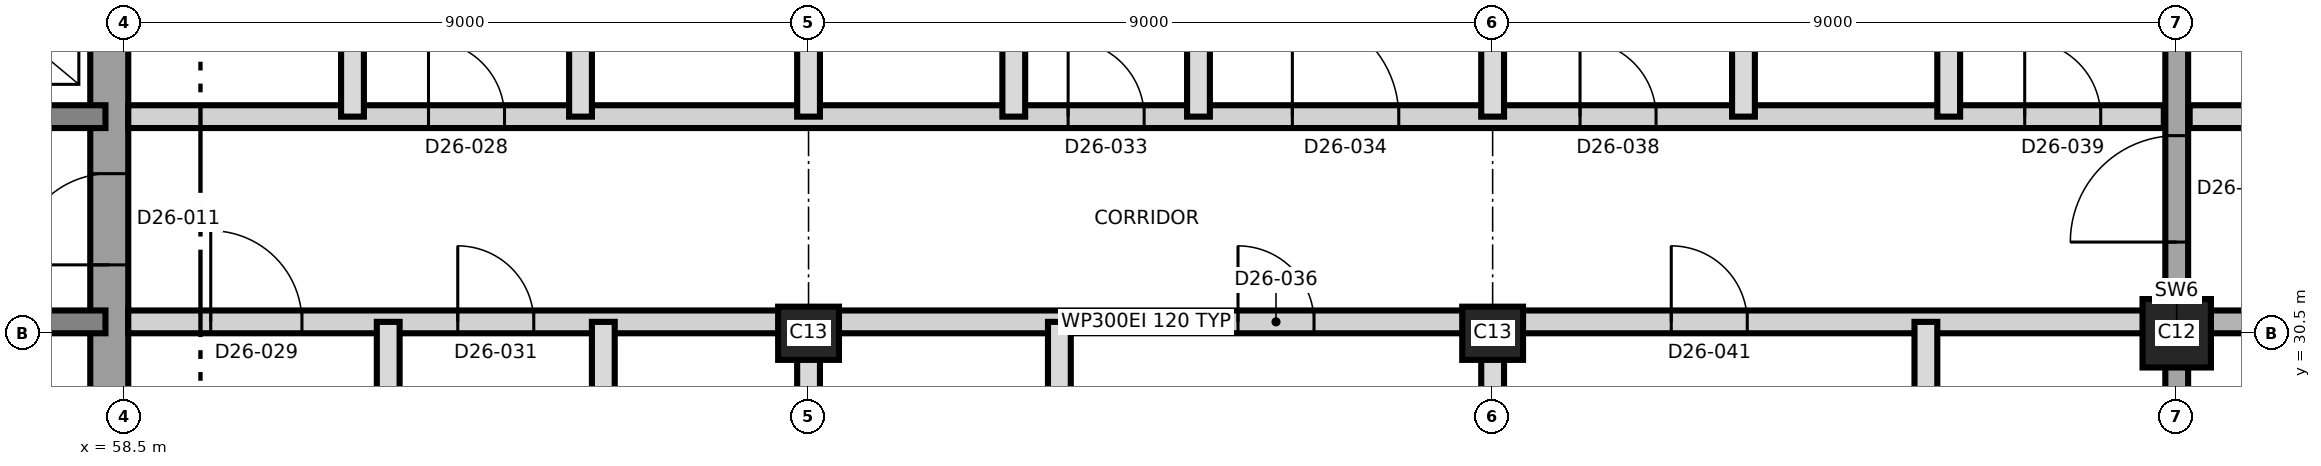
"""IFC4 building model, lengths in metres.
Left out: names, types, materials, properties, quantities, classifications, styles, units other than length and angle.
Written with IfcOpenShell. Run it as: python <this file> out.ifc"""

import sys

from ifc_helpers import new_model, si_unit, direction, frame, frame_2d, origin, origin_2d, place, context, subcontext, project, spatial, rectangle, extrude, element, fill, save


model = new_model("IFC4")
c1 = context("Model", 3, precision=1e-05, world=origin(), true_north=direction((0.0, 1.0)))
c2 = subcontext(c1, "Body", "Model", "MODEL_VIEW")
j1 = project(units=[si_unit("LENGTHUNIT", "METRE"), si_unit("PLANEANGLEUNIT", "RADIAN")], contexts=[c1])
p1 = place(None, origin())
s1 = spatial("IfcSite", under=j1, at=p1, CompositionType="ELEMENT")
p2 = place(p1, origin())
s2 = spatial("IfcBuilding", under=s1, at=p2, CompositionType="ELEMENT")
p3 = place(p2, frame((0.0, 0.0, 240.2)))
s3 = spatial("IfcBuildingStorey", under=s2, at=p3, CompositionType="ELEMENT", Elevation=240.2)
p4 = place(p3, frame((58.3, 21.25, 0.0), z_axis=(0.0, 0.0, 1.0), x_axis=(0.0, 1.0, 0.0)))
e1 = element("IfcWall", 1, at=p4, inside=s3, PredefinedType="SHEAR", context=c2, shape_type="SweptSolid", body=[
    extrude(rectangle(XDim=18.5, YDim=0.5, at=frame_2d((9.25, 0.0))), origin(), (0.0, 0.0, 1.0), 3.7),
])
p5 = place(p4, frame((10.15, 0.0, 0.0)))
e2 = element("IfcOpeningElement", 2, at=p5, cuts=e1, PredefinedType="OPENING", context=c2, shape_type="SweptSolid", body=[
    extrude(rectangle(XDim=1.2, YDim=2.1, at=frame_2d((0.6, 1.05))), frame((0.0, 0.26, 0.0), z_axis=(0.0, -1.0, 0.0), x_axis=(1.0, 0.0, 0.0)), (0.0, 0.0, 1.0), 0.52),
])
p6 = place(p3, frame((31.75, 30.65, 0.0), z_axis=(0.0, 0.0, 1.0), x_axis=(1.0, 0.0, 0.0)))
e3 = element("IfcWall", 3, at=p6, inside=s3, PredefinedType="SHEAR", context=c2, shape_type="SweptSolid", body=[
    extrude(rectangle(XDim=26.5, YDim=0.3, at=frame_2d((13.25, 0.0))), origin(), (0.0, 0.0, 1.0), 3.7),
])
p7 = place(p6, frame((24.75, 0.0, 0.0)))
e4 = element("IfcOpeningElement", 4, at=p7, cuts=e3, PredefinedType="OPENING", context=c2, shape_type="SweptSolid", body=[
    extrude(rectangle(XDim=1.0, YDim=2.1, at=frame_2d((0.5, 1.05))), frame((0.0, 0.16, 0.0), z_axis=(0.0, -1.0, 0.0), x_axis=(1.0, 0.0, 0.0)), (0.0, 0.0, 1.0), 0.32),
])
p8 = place(p3, frame((31.75, 33.35, 0.0), z_axis=(0.0, 0.0, 1.0), x_axis=(1.0, 0.0, 0.0)))
e5 = element("IfcWall", 5, at=p8, inside=s3, PredefinedType="SHEAR", context=c2, shape_type="SweptSolid", body=[
    extrude(rectangle(XDim=26.5, YDim=0.3, at=frame_2d((13.25, 0.0))), origin(), (0.0, 0.0, 1.0), 3.7),
])
p9 = place(p8, frame((13.9, 0.0, 0.0)))
e6 = element("IfcOpeningElement", 6, at=p9, cuts=e5, PredefinedType="OPENING", context=c2, shape_type="SweptSolid", body=[
    extrude(rectangle(XDim=1.4, YDim=2.1, at=frame_2d((0.7, 1.05))), frame((0.0, 0.16, 0.0), z_axis=(0.0, -1.0, 0.0), x_axis=(1.0, 0.0, 0.0)), (0.0, 0.0, 1.0), 0.32),
])
p10 = place(p8, frame((5.375, 0.0, 0.0)))
e7 = element("IfcOpeningElement", 7, at=p10, cuts=e5, PredefinedType="OPENING", context=c2, shape_type="SweptSolid", body=[
    extrude(rectangle(XDim=1.2, YDim=2.1, at=frame_2d((0.6, 1.05))), frame((0.0, 0.16, 0.0), z_axis=(0.0, -1.0, 0.0), x_axis=(1.0, 0.0, 0.0)), (0.0, 0.0, 1.0), 0.32),
])
p11 = place(p8, frame((19.925, 0.0, 0.0)))
e8 = element("IfcOpeningElement", 8, at=p11, cuts=e5, PredefinedType="OPENING", context=c2, shape_type="SweptSolid", body=[
    extrude(rectangle(XDim=1.2, YDim=2.1, at=frame_2d((0.6, 1.05))), frame((0.0, 0.16, 0.0), z_axis=(0.0, -1.0, 0.0), x_axis=(1.0, 0.0, 0.0)), (0.0, 0.0, 1.0), 0.32),
])
for number, where, z_axis, x_axis in (
    (9, (67.5, 30.5, 0.0), (0.0, 0.0, 1.0), (1.0, 0.0, 0.0)),
    (10, (76.5, 30.5, 0.0), (0.0, 0.0, 1.0), (1.0, 0.0, 0.0)),
):
    element("IfcColumn", number, at=place(p3, frame(where, z_axis=z_axis, x_axis=x_axis)), inside=s3, PredefinedType="COLUMN", context=c2, shape_type="SweptSolid", body=[
        extrude(rectangle(XDim=0.8, YDim=0.7, at=origin_2d()), origin(), (0.0, 0.0, 1.0), 3.7),
    ])
p12 = place(p3, frame((85.5, 30.5, 0.0), z_axis=(0.0, 0.0, 1.0), x_axis=(1.0, 0.0, 0.0)))
e11 = element("IfcColumn", 11, at=p12, inside=s3, PredefinedType="COLUMN", context=c2, shape_type="SweptSolid", body=[
    extrude(rectangle(XDim=0.9, YDim=0.9, at=origin_2d()), origin(), (0.0, 0.0, 1.0), 3.7),
])
p13 = place(p3, frame((85.5, 19.275, 0.0), z_axis=(0.0, 0.0, 1.0), x_axis=(0.0, 1.0, 0.0)))
e12 = element("IfcWall", 12, at=p13, inside=s3, PredefinedType="SHEAR", context=c2, shape_type="SweptSolid", body=[
    extrude(rectangle(XDim=22.45, YDim=0.3, at=frame_2d((11.225, 0.0))), origin(), (0.0, 0.0, 1.0), 3.7),
])
p14 = place(p13, frame((12.425, 0.0, 0.0)))
e13 = element("IfcOpeningElement", 13, at=p14, cuts=e12, PredefinedType="OPENING", context=c2, shape_type="SweptSolid", body=[
    extrude(rectangle(XDim=1.4, YDim=2.1, at=frame_2d((0.7, 1.05))), frame((0.0, 0.16, 0.0), z_axis=(0.0, -1.0, 0.0), x_axis=(1.0, 0.0, 0.0)), (0.0, 0.0, 1.0), 0.32),
])
p15 = place(p3, frame((58.55, 30.65, 0.0), z_axis=(0.0, 0.0, 1.0), x_axis=(1.0, 0.0, 0.0)))
e14 = element("IfcWall", 14, at=p15, inside=s3, PredefinedType="PARTITIONING", context=c2, shape_type="SweptSolid", body=[
    extrude(rectangle(XDim=26.78, YDim=0.3, at=frame_2d((13.39, 0.0))), origin(), (0.0, 0.0, 1.0), 3.4),
])
p16 = place(p15, frame((1.085, 0.0, 0.0)))
e15 = element("IfcOpeningElement", 15, at=p16, cuts=e14, PredefinedType="OPENING", context=c2, shape_type="SweptSolid", body=[
    extrude(rectangle(XDim=1.2, YDim=2.1, at=frame_2d((0.6, 1.05))), frame((0.0, 0.16, 0.0), z_axis=(0.0, -1.0, 0.0), x_axis=(1.0, 0.0, 0.0)), (0.0, 0.0, 1.0), 0.32),
])
p17 = place(p15, frame((4.335, 0.0, 0.0)))
e16 = element("IfcOpeningElement", 16, at=p17, cuts=e14, PredefinedType="OPENING", context=c2, shape_type="SweptSolid", body=[
    extrude(rectangle(XDim=1.0, YDim=2.1, at=frame_2d((0.5, 1.05))), frame((0.0, 0.16, 0.0), z_axis=(0.0, -1.0, 0.0), x_axis=(1.0, 0.0, 0.0)), (0.0, 0.0, 1.0), 0.32),
])
p18 = place(p15, frame((14.6, 0.0, 0.0)))
e17 = element("IfcOpeningElement", 17, at=p18, cuts=e14, PredefinedType="OPENING", context=c2, shape_type="SweptSolid", body=[
    extrude(rectangle(XDim=1.0, YDim=2.4, at=frame_2d((0.5, 1.2))), frame((0.0, 0.16, 0.0), z_axis=(0.0, -1.0, 0.0), x_axis=(1.0, 0.0, 0.0)), (0.0, 0.0, 1.0), 0.32),
])
p19 = place(p15, frame((20.3, 0.0, 0.0)))
e18 = element("IfcOpeningElement", 18, at=p19, cuts=e14, PredefinedType="OPENING", context=c2, shape_type="SweptSolid", body=[
    extrude(rectangle(XDim=1.0, YDim=2.4, at=frame_2d((0.5, 1.2))), frame((0.0, 0.16, 0.0), z_axis=(0.0, -1.0, 0.0), x_axis=(1.0, 0.0, 0.0)), (0.0, 0.0, 1.0), 0.32),
])
p20 = place(p3, frame((85.67, 30.65, 0.0), z_axis=(0.0, 0.0, 1.0), x_axis=(1.0, 0.0, 0.0)))
e19 = element("IfcWall", 19, at=p20, inside=s3, PredefinedType="SHEAR", context=c2, shape_type="SweptSolid", body=[
    extrude(rectangle(XDim=9.58, YDim=0.3, at=frame_2d((4.79, 0.0))), origin(), (0.0, 0.0, 1.0), 3.4),
])
p21 = place(p20, frame((2.08, 0.0, 0.0)))
e20 = element("IfcOpeningElement", 20, at=p21, cuts=e19, PredefinedType="OPENING", context=c2, shape_type="SweptSolid", body=[
    extrude(rectangle(XDim=1.2, YDim=2.1, at=frame_2d((0.6, 1.05))), frame((0.0, 0.16, 0.0), z_axis=(0.0, -1.0, 0.0), x_axis=(1.0, 0.0, 0.0)), (0.0, 0.0, 1.0), 0.32),
])
p22 = place(p20, frame((5.63, 0.0, 0.0)))
e21 = element("IfcOpeningElement", 21, at=p22, cuts=e19, PredefinedType="OPENING", context=c2, shape_type="SweptSolid", body=[
    extrude(rectangle(XDim=1.0, YDim=2.1, at=frame_2d((0.5, 1.05))), frame((0.0, 0.16, 0.0), z_axis=(0.0, -1.0, 0.0), x_axis=(1.0, 0.0, 0.0)), (0.0, 0.0, 1.0), 0.32),
])
p23 = place(p3, frame((58.55, 33.35, 0.0), z_axis=(0.0, 0.0, 1.0), x_axis=(1.0, 0.0, 0.0)))
e22 = element("IfcWall", 22, at=p23, inside=s3, PredefinedType="PARTITIONING", context=c2, shape_type="SweptSolid", body=[
    extrude(rectangle(XDim=26.78, YDim=0.3, at=frame_2d((13.39, 0.0))), origin(), (0.0, 0.0, 1.0), 3.4),
])
p24 = place(p23, frame((3.95, 0.0, 0.0)))
e23 = element("IfcOpeningElement", 23, at=p24, cuts=e22, PredefinedType="OPENING", context=c2, shape_type="SweptSolid", body=[
    extrude(rectangle(XDim=1.0, YDim=2.4, at=frame_2d((0.5, 1.2))), frame((0.0, 0.16, 0.0), z_axis=(0.0, -1.0, 0.0), x_axis=(1.0, 0.0, 0.0)), (0.0, 0.0, 1.0), 0.32),
])
p25 = place(p23, frame((12.365, 0.0, 0.0)))
e24 = element("IfcOpeningElement", 24, at=p25, cuts=e22, PredefinedType="OPENING", context=c2, shape_type="SweptSolid", body=[
    extrude(rectangle(XDim=1.0, YDim=2.1, at=frame_2d((0.5, 1.05))), frame((0.0, 0.16, 0.0), z_axis=(0.0, -1.0, 0.0), x_axis=(1.0, 0.0, 0.0)), (0.0, 0.0, 1.0), 0.32),
])
p26 = place(p23, frame((15.315, 0.0, 0.0)))
e25 = element("IfcOpeningElement", 25, at=p26, cuts=e22, PredefinedType="OPENING", context=c2, shape_type="SweptSolid", body=[
    extrude(rectangle(XDim=1.4, YDim=2.1, at=frame_2d((0.7, 1.05))), frame((0.0, 0.16, 0.0), z_axis=(0.0, -1.0, 0.0), x_axis=(1.0, 0.0, 0.0)), (0.0, 0.0, 1.0), 0.32),
])
p27 = place(p23, frame((19.1, 0.0, 0.0)))
e26 = element("IfcOpeningElement", 26, at=p27, cuts=e22, PredefinedType="OPENING", context=c2, shape_type="SweptSolid", body=[
    extrude(rectangle(XDim=1.0, YDim=2.1, at=frame_2d((0.5, 1.05))), frame((0.0, 0.16, 0.0), z_axis=(0.0, -1.0, 0.0), x_axis=(1.0, 0.0, 0.0)), (0.0, 0.0, 1.0), 0.32),
])
p28 = place(p23, frame((24.95, 0.0, 0.0)))
e27 = element("IfcOpeningElement", 27, at=p28, cuts=e22, PredefinedType="OPENING", context=c2, shape_type="SweptSolid", body=[
    extrude(rectangle(XDim=1.0, YDim=2.1, at=frame_2d((0.5, 1.05))), frame((0.0, 0.16, 0.0), z_axis=(0.0, -1.0, 0.0), x_axis=(1.0, 0.0, 0.0)), (0.0, 0.0, 1.0), 0.32),
])
p29 = place(p3, frame((85.67, 33.35, 0.0), z_axis=(0.0, 0.0, 1.0), x_axis=(1.0, 0.0, 0.0)))
e28 = element("IfcWall", 28, at=p29, inside=s3, PredefinedType="PARTITIONING", context=c2, shape_type="SweptSolid", body=[
    extrude(rectangle(XDim=9.58, YDim=0.3, at=frame_2d((4.79, 0.0))), origin(), (0.0, 0.0, 1.0), 3.4),
])
p30 = place(p29, frame((1.83, 0.0, 0.0)))
e29 = element("IfcOpeningElement", 29, at=p30, cuts=e28, PredefinedType="OPENING", context=c2, shape_type="SweptSolid", body=[
    extrude(rectangle(XDim=1.0, YDim=2.1, at=frame_2d((0.5, 1.05))), frame((0.0, 0.16, 0.0), z_axis=(0.0, -1.0, 0.0), x_axis=(1.0, 0.0, 0.0)), (0.0, 0.0, 1.0), 0.32),
])
p31 = place(p29, frame((5.63, 0.0, 0.0)))
e30 = element("IfcOpeningElement", 30, at=p31, cuts=e28, PredefinedType="OPENING", context=c2, shape_type="SweptSolid", body=[
    extrude(rectangle(XDim=1.0, YDim=2.1, at=frame_2d((0.5, 1.05))), frame((0.0, 0.16, 0.0), z_axis=(0.0, -1.0, 0.0), x_axis=(1.0, 0.0, 0.0)), (0.0, 0.0, 1.0), 0.32),
])
p32 = place(p3, frame((61.5, 33.35, 0.0), z_axis=(0.0, 0.0, 1.0), x_axis=(0.0, 1.0, 0.0)))
e31 = element("IfcWall", 31, at=p32, inside=s3, PredefinedType="PARTITIONING", context=c2, shape_type="SweptSolid", body=[
    extrude(rectangle(XDim=3.3, YDim=0.3, at=frame_2d((1.65, 0.0))), origin(), (0.0, 0.0, 1.0), 3.4),
])
p33 = place(p3, frame((61.97, 19.275, 0.0), z_axis=(0.0, 0.0, 1.0), x_axis=(0.0, 1.0, 0.0)))
e32 = element("IfcWall", 32, at=p33, inside=s3, PredefinedType="PARTITIONING", context=c2, shape_type="SweptSolid", body=[
    extrude(rectangle(XDim=11.375, YDim=0.3, at=frame_2d((5.688, 0.0))), origin(), (0.0, 0.0, 1.0), 3.35),
])
p34 = place(p3, frame((64.5, 33.35, 0.0), z_axis=(0.0, 0.0, 1.0), x_axis=(0.0, 1.0, 0.0)))
e33 = element("IfcWall", 33, at=p34, inside=s3, PredefinedType="PARTITIONING", context=c2, shape_type="SweptSolid", body=[
    extrude(rectangle(XDim=3.3, YDim=0.3, at=frame_2d((1.65, 0.0))), origin(), (0.0, 0.0, 1.0), 3.4),
])
p35 = place(p3, frame((64.8, 27.45, 0.0), z_axis=(0.0, 0.0, 1.0), x_axis=(0.0, 1.0, 0.0)))
e34 = element("IfcWall", 34, at=p35, inside=s3, PredefinedType="PARTITIONING", context=c2, shape_type="SweptSolid", body=[
    extrude(rectangle(XDim=3.2, YDim=0.3, at=frame_2d((1.6, 0.0))), origin(), (0.0, 0.0, 1.0), 3.4),
])
p36 = place(p3, frame((67.5, 19.275, 0.0), z_axis=(0.0, 0.0, 1.0), x_axis=(0.0, 1.0, 0.0)))
e35 = element("IfcWall", 35, at=p36, inside=s3, PredefinedType="PARTITIONING", context=c2, shape_type="SweptSolid", body=[
    extrude(rectangle(XDim=11.375, YDim=0.3, at=frame_2d((5.688, 0.0))), origin(), (0.0, 0.0, 1.0), 3.35),
])
p37 = place(p3, frame((67.5, 33.35, 0.0), z_axis=(0.0, 0.0, 1.0), x_axis=(0.0, 1.0, 0.0)))
e36 = element("IfcWall", 36, at=p37, inside=s3, PredefinedType="PARTITIONING", context=c2, shape_type="SweptSolid", body=[
    extrude(rectangle(XDim=8.555, YDim=0.3, at=frame_2d((4.277, 0.0))), origin(), (0.0, 0.0, 1.0), 3.35),
])
p38 = place(p3, frame((70.2, 33.35, 0.0), z_axis=(0.0, 0.0, 1.0), x_axis=(0.0, 1.0, 0.0)))
e37 = element("IfcWall", 37, at=p38, inside=s3, PredefinedType="PARTITIONING", context=c2, shape_type="SweptSolid", body=[
    extrude(rectangle(XDim=3.2, YDim=0.3, at=frame_2d((1.6, 0.0))), origin(), (0.0, 0.0, 1.0), 3.4),
])
p39 = place(p3, frame((70.8, 27.15, 0.0), z_axis=(0.0, 0.0, 1.0), x_axis=(0.0, 1.0, 0.0)))
e38 = element("IfcWall", 38, at=p39, inside=s3, PredefinedType="PARTITIONING", context=c2, shape_type="SweptSolid", body=[
    extrude(rectangle(XDim=3.5, YDim=0.3, at=frame_2d((1.75, 0.0))), origin(), (0.0, 0.0, 1.0), 3.4),
])
p40 = place(p3, frame((72.63, 33.35, 0.0), z_axis=(0.0, 0.0, 1.0), x_axis=(0.0, 1.0, 0.0)))
e39 = element("IfcWall", 39, at=p40, inside=s3, PredefinedType="PARTITIONING", context=c2, shape_type="SweptSolid", body=[
    extrude(rectangle(XDim=8.555, YDim=0.3, at=frame_2d((4.277, 0.0))), origin(), (0.0, 0.0, 1.0), 3.35),
])
p41 = place(p3, frame((76.5, 19.275, 0.0), z_axis=(0.0, 0.0, 1.0), x_axis=(0.0, 1.0, 0.0)))
e40 = element("IfcWall", 40, at=p41, inside=s3, PredefinedType="PARTITIONING", context=c2, shape_type="SweptSolid", body=[
    extrude(rectangle(XDim=11.375, YDim=0.3, at=frame_2d((5.688, 0.0))), origin(), (0.0, 0.0, 1.0), 3.35),
])
p42 = place(p3, frame((76.5, 33.35, 0.0), z_axis=(0.0, 0.0, 1.0), x_axis=(0.0, 1.0, 0.0)))
e41 = element("IfcWall", 41, at=p42, inside=s3, PredefinedType="PARTITIONING", context=c2, shape_type="SweptSolid", body=[
    extrude(rectangle(XDim=8.555, YDim=0.3, at=frame_2d((4.277, 0.0))), origin(), (0.0, 0.0, 1.0), 3.35),
])
p43 = place(p3, frame((79.8, 33.35, 0.0), z_axis=(0.0, 0.0, 1.0), x_axis=(0.0, 1.0, 0.0)))
e42 = element("IfcWall", 42, at=p43, inside=s3, PredefinedType="PARTITIONING", context=c2, shape_type="SweptSolid", body=[
    extrude(rectangle(XDim=3.2, YDim=0.3, at=frame_2d((1.6, 0.0))), origin(), (0.0, 0.0, 1.0), 3.4),
])
p44 = place(p3, frame((82.2, 27.15, 0.0), z_axis=(0.0, 0.0, 1.0), x_axis=(0.0, 1.0, 0.0)))
e43 = element("IfcWall", 43, at=p44, inside=s3, PredefinedType="PARTITIONING", context=c2, shape_type="SweptSolid", body=[
    extrude(rectangle(XDim=3.5, YDim=0.3, at=frame_2d((1.75, 0.0))), origin(), (0.0, 0.0, 1.0), 3.4),
])
p45 = place(p3, frame((82.5, 33.35, 0.0), z_axis=(0.0, 0.0, 1.0), x_axis=(0.0, 1.0, 0.0)))
e44 = element("IfcWall", 44, at=p45, inside=s3, PredefinedType="PARTITIONING", context=c2, shape_type="SweptSolid", body=[
    extrude(rectangle(XDim=8.555, YDim=0.3, at=frame_2d((4.277, 0.0))), origin(), (0.0, 0.0, 1.0), 3.35),
])
p46 = place(p5, origin())
e45 = element("IfcDoor", 45, at=p46, inside=s3, OperationType="SINGLE_SWING_LEFT", PredefinedType="DOOR", context=c2, shape_type="SweptSolid", body=[
    extrude(rectangle(XDim=1.2, YDim=2.1, at=frame_2d((0.6, 1.05))), frame((0.0, 0.025, 0.0), z_axis=(0.0, -1.0, 0.0), x_axis=(1.0, 0.0, 0.0)), (0.0, 0.0, 1.0), 0.05),
])
fill(e2, e45)
p47 = place(p24, origin())
e46 = element("IfcDoor", 46, at=p47, inside=s3, OperationType="SINGLE_SWING_LEFT", PredefinedType="DOOR", context=c2, shape_type="SweptSolid", body=[
    extrude(rectangle(XDim=1.0, YDim=2.4, at=frame_2d((0.5, 1.2))), frame((0.0, 0.025, 0.0), z_axis=(0.0, -1.0, 0.0), x_axis=(1.0, 0.0, 0.0)), (0.0, 0.0, 1.0), 0.05),
])
fill(e23, e46)
p48 = place(p16, origin())
e47 = element("IfcDoor", 47, at=p48, inside=s3, OperationType="SINGLE_SWING_LEFT", PredefinedType="DOOR", context=c2, shape_type="SweptSolid", body=[
    extrude(rectangle(XDim=1.2, YDim=2.1, at=frame_2d((0.6, 1.05))), frame((0.0, 0.025, 0.0), z_axis=(0.0, -1.0, 0.0), x_axis=(1.0, 0.0, 0.0)), (0.0, 0.0, 1.0), 0.05),
])
fill(e15, e47)
p49 = place(p17, origin())
e48 = element("IfcDoor", 48, at=p49, inside=s3, OperationType="SINGLE_SWING_LEFT", PredefinedType="DOOR", context=c2, shape_type="SweptSolid", body=[
    extrude(rectangle(XDim=1.0, YDim=2.1, at=frame_2d((0.5, 1.05))), frame((0.0, 0.025, 0.0), z_axis=(0.0, -1.0, 0.0), x_axis=(1.0, 0.0, 0.0)), (0.0, 0.0, 1.0), 0.05),
])
fill(e16, e48)
p50 = place(p25, origin())
e49 = element("IfcDoor", 49, at=p50, inside=s3, OperationType="SINGLE_SWING_LEFT", PredefinedType="DOOR", context=c2, shape_type="SweptSolid", body=[
    extrude(rectangle(XDim=1.0, YDim=2.1, at=frame_2d((0.5, 1.05))), frame((0.0, 0.025, 0.0), z_axis=(0.0, -1.0, 0.0), x_axis=(1.0, 0.0, 0.0)), (0.0, 0.0, 1.0), 0.05),
])
fill(e24, e49)
p51 = place(p26, origin())
e50 = element("IfcDoor", 50, at=p51, inside=s3, OperationType="SINGLE_SWING_RIGHT", PredefinedType="DOOR", context=c2, shape_type="SweptSolid", body=[
    extrude(rectangle(XDim=1.4, YDim=2.1, at=frame_2d((0.7, 1.05))), frame((0.0, 0.025, 0.0), z_axis=(0.0, -1.0, 0.0), x_axis=(1.0, 0.0, 0.0)), (0.0, 0.0, 1.0), 0.05),
])
fill(e25, e50)
p52 = place(p18, origin())
e51 = element("IfcDoor", 51, at=p52, inside=s3, OperationType="SINGLE_SWING_LEFT", PredefinedType="DOOR", context=c2, shape_type="SweptSolid", body=[
    extrude(rectangle(XDim=1.0, YDim=2.4, at=frame_2d((0.5, 1.2))), frame((0.0, 0.025, 0.0), z_axis=(0.0, -1.0, 0.0), x_axis=(1.0, 0.0, 0.0)), (0.0, 0.0, 1.0), 0.05),
])
fill(e17, e51)
p53 = place(p27, origin())
e52 = element("IfcDoor", 52, at=p53, inside=s3, OperationType="SINGLE_SWING_RIGHT", PredefinedType="DOOR", context=c2, shape_type="SweptSolid", body=[
    extrude(rectangle(XDim=1.0, YDim=2.1, at=frame_2d((0.5, 1.05))), frame((0.0, 0.025, 0.0), z_axis=(0.0, -1.0, 0.0), x_axis=(1.0, 0.0, 0.0)), (0.0, 0.0, 1.0), 0.05),
])
fill(e26, e52)
p54 = place(p28, origin())
e53 = element("IfcDoor", 53, at=p54, inside=s3, OperationType="SINGLE_SWING_LEFT", PredefinedType="DOOR", context=c2, shape_type="SweptSolid", body=[
    extrude(rectangle(XDim=1.0, YDim=2.1, at=frame_2d((0.5, 1.05))), frame((0.0, 0.025, 0.0), z_axis=(0.0, -1.0, 0.0), x_axis=(1.0, 0.0, 0.0)), (0.0, 0.0, 1.0), 0.05),
])
fill(e27, e53)
p55 = place(p19, origin())
e54 = element("IfcDoor", 54, at=p55, inside=s3, OperationType="SINGLE_SWING_RIGHT", PredefinedType="DOOR", context=c2, shape_type="SweptSolid", body=[
    extrude(rectangle(XDim=1.0, YDim=2.4, at=frame_2d((0.5, 1.2))), frame((0.0, 0.025, 0.0), z_axis=(0.0, -1.0, 0.0), x_axis=(1.0, 0.0, 0.0)), (0.0, 0.0, 1.0), 0.05),
])
fill(e18, e54)
p56 = place(p14, origin())
e55 = element("IfcDoor", 55, at=p56, inside=s3, OperationType="SINGLE_SWING_RIGHT", PredefinedType="DOOR", context=c2, shape_type="SweptSolid", body=[
    extrude(rectangle(XDim=1.4, YDim=2.1, at=frame_2d((0.7, 1.05))), frame((0.0, 0.025, 0.0), z_axis=(0.0, -1.0, 0.0), x_axis=(1.0, 0.0, 0.0)), (0.0, 0.0, 1.0), 0.05),
])
fill(e13, e55)
save(model, sys.argv[1])
